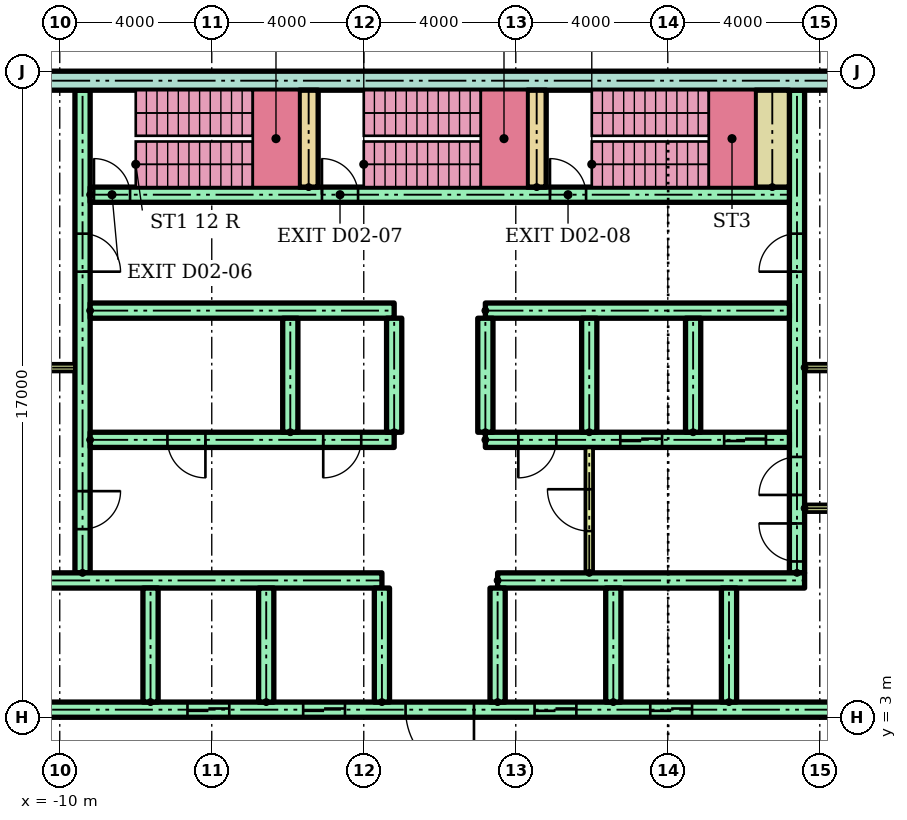
"""IFC4 building model, lengths in metres.
Left out: names, types, materials, properties, quantities, classifications, styles, units other than length and angle.
Written with IfcOpenShell. Run it as: python <this file> out.ifc"""

import sys

from ifc_helpers import new_model, si_unit, direction, frame, frame_2d, origin, place, context, subcontext, project, spatial, rectangle, extrude, element, fill, save


model = new_model("IFC4")
c1 = context("Model", 3, precision=1e-05, world=origin(), true_north=direction((0.0, 1.0)))
c2 = subcontext(c1, "Body", "Model", "MODEL_VIEW")
j1 = project(units=[si_unit("LENGTHUNIT", "METRE"), si_unit("PLANEANGLEUNIT", "RADIAN")], contexts=[c1])
p1 = place(None, origin())
s1 = spatial("IfcSite", under=j1, at=p1, CompositionType="ELEMENT")
p2 = place(p1, origin())
s2 = spatial("IfcBuilding", under=s1, at=p2, CompositionType="ELEMENT")
p3 = place(p2, frame((0.0, 0.0, 10.0)))
s3 = spatial("IfcBuildingStorey", under=s2, at=p3, CompositionType="ELEMENT", Elevation=10.0)
p4 = place(p3, frame((-13.5, 19.75, 0.0)))
e1 = element("IfcWall", 1, at=p4, inside=s3, PredefinedType="SHEAR", context=c2, shape_type="SweptSolid", body=[
    extrude(rectangle(XDim=27.0, YDim=0.5, at=frame_2d((13.5, 0.0))), origin(), (0.0, 0.0, 1.0), 3.7),
])
p5 = place(p3, frame((-9.4, 6.8, 0.0), z_axis=(0.0, 0.0, 1.0), x_axis=(0.0, 1.0, 0.0)))
e2 = element("IfcWall", 2, at=p5, inside=s3, PredefinedType="SHEAR", context=c2, shape_type="SweptSolid", body=[
    extrude(rectangle(XDim=12.7, YDim=0.4, at=frame_2d((6.35, 0.0))), origin(), (0.0, 0.0, 1.0), 3.7),
])
p6 = place(p5, frame((1.15, 0.0, 0.0)))
e3 = element("IfcOpeningElement", 3, at=p6, cuts=e2, PredefinedType="OPENING", context=c2, shape_type="SweptSolid", body=[
    extrude(rectangle(XDim=1.0, YDim=2.1, at=frame_2d((0.5, 1.05))), frame((0.0, 0.21, 0.0), z_axis=(0.0, -1.0, 0.0), x_axis=(1.0, 0.0, 0.0)), (0.0, 0.0, 1.0), 0.42),
])
p7 = place(p5, frame((7.925, 0.0, 0.0)))
e4 = element("IfcOpeningElement", 4, at=p7, cuts=e2, PredefinedType="OPENING", context=c2, shape_type="SweptSolid", body=[
    extrude(rectangle(XDim=1.0, YDim=2.1, at=frame_2d((0.5, 1.05))), frame((0.0, 0.21, 0.0), z_axis=(0.0, -1.0, 0.0), x_axis=(1.0, 0.0, 0.0)), (0.0, 0.0, 1.0), 0.42),
])
p8 = place(p3, frame((9.4, 6.8, 0.0), z_axis=(0.0, 0.0, 1.0), x_axis=(0.0, 1.0, 0.0)))
e5 = element("IfcWall", 5, at=p8, inside=s3, PredefinedType="SHEAR", context=c2, shape_type="SweptSolid", body=[
    extrude(rectangle(XDim=12.7, YDim=0.4, at=frame_2d((6.35, 0.0))), origin(), (0.0, 0.0, 1.0), 3.7),
])
p9 = place(p8, frame((0.3, 0.0, 0.0)))
e6 = element("IfcOpeningElement", 6, at=p9, cuts=e5, PredefinedType="OPENING", context=c2, shape_type="SweptSolid", body=[
    extrude(rectangle(XDim=1.0, YDim=2.1, at=frame_2d((0.5, 1.05))), frame((0.0, 0.21, 0.0), z_axis=(0.0, -1.0, 0.0), x_axis=(1.0, 0.0, 0.0)), (0.0, 0.0, 1.0), 0.42),
])
p10 = place(p8, frame((2.05, 0.0, 0.0)))
e7 = element("IfcOpeningElement", 7, at=p10, cuts=e5, PredefinedType="OPENING", context=c2, shape_type="SweptSolid", body=[
    extrude(rectangle(XDim=1.0, YDim=2.1, at=frame_2d((0.5, 1.05))), frame((0.0, 0.21, 0.0), z_axis=(0.0, -1.0, 0.0), x_axis=(1.0, 0.0, 0.0)), (0.0, 0.0, 1.0), 0.42),
])
p11 = place(p8, frame((7.925, 0.0, 0.0)))
e8 = element("IfcOpeningElement", 8, at=p11, cuts=e5, PredefinedType="OPENING", context=c2, shape_type="SweptSolid", body=[
    extrude(rectangle(XDim=1.0, YDim=2.1, at=frame_2d((0.5, 1.05))), frame((0.0, 0.21, 0.0), z_axis=(0.0, -1.0, 0.0), x_axis=(1.0, 0.0, 0.0)), (0.0, 0.0, 1.0), 0.42),
])
p12 = place(p3, frame((-13.5, 3.2, 0.0)))
e9 = element("IfcWall", 9, at=p12, inside=s3, PredefinedType="SHEAR", context=c2, shape_type="SweptSolid", body=[
    extrude(rectangle(XDim=27.0, YDim=0.4, at=frame_2d((13.5, 0.0))), origin(), (0.0, 0.0, 1.0), 3.7),
])
p13 = place(p12, frame((6.861, 0.0, 0.0)))
e10 = element("IfcOpeningElement", 10, at=p13, cuts=e9, PredefinedType="OPENING", context=c2, shape_type="SweptSolid", body=[
    extrude(rectangle(XDim=1.1, YDim=2.1, at=frame_2d((0.55, 1.05))), frame((0.0, 0.21, 0.0), z_axis=(0.0, -1.0, 0.0), x_axis=(1.0, 0.0, 0.0)), (0.0, 0.0, 1.0), 0.42),
])
p14 = place(p12, frame((9.906, 0.0, 0.0)))
e11 = element("IfcOpeningElement", 11, at=p14, cuts=e9, PredefinedType="OPENING", context=c2, shape_type="SweptSolid", body=[
    extrude(rectangle(XDim=1.1, YDim=2.1, at=frame_2d((0.55, 1.05))), frame((0.0, 0.21, 0.0), z_axis=(0.0, -1.0, 0.0), x_axis=(1.0, 0.0, 0.0)), (0.0, 0.0, 1.0), 0.42),
])
p15 = place(p12, frame((15.994, 0.0, 0.0)))
e12 = element("IfcOpeningElement", 12, at=p15, cuts=e9, PredefinedType="OPENING", context=c2, shape_type="SweptSolid", body=[
    extrude(rectangle(XDim=1.1, YDim=2.1, at=frame_2d((0.55, 1.05))), frame((0.0, 0.21, 0.0), z_axis=(0.0, -1.0, 0.0), x_axis=(1.0, 0.0, 0.0)), (0.0, 0.0, 1.0), 0.42),
])
p16 = place(p12, frame((19.039, 0.0, 0.0)))
e13 = element("IfcOpeningElement", 13, at=p16, cuts=e9, PredefinedType="OPENING", context=c2, shape_type="SweptSolid", body=[
    extrude(rectangle(XDim=1.1, YDim=2.1, at=frame_2d((0.55, 1.05))), frame((0.0, 0.21, 0.0), z_axis=(0.0, -1.0, 0.0), x_axis=(1.0, 0.0, 0.0)), (0.0, 0.0, 1.0), 0.42),
])
p17 = place(p12, frame((12.6, 0.0, 0.0)))
e14 = element("IfcOpeningElement", 14, at=p17, cuts=e9, PredefinedType="OPENING", context=c2, shape_type="SweptSolid", body=[
    extrude(rectangle(XDim=1.8, YDim=2.1, at=frame_2d((0.9, 1.05))), frame((0.0, 0.21, 0.0), z_axis=(0.0, -1.0, 0.0), x_axis=(1.0, 0.0, 0.0)), (0.0, 0.0, 1.0), 0.42),
])
p18 = place(p3, frame((-13.5, 6.6, 0.0)))
e15 = element("IfcWall", 15, at=p18, inside=s3, PredefinedType="SHEAR", context=c2, shape_type="SweptSolid", body=[
    extrude(rectangle(XDim=11.978, YDim=0.4, at=frame_2d((5.989, 0.0))), origin(), (0.0, 0.0, 1.0), 3.7),
])
p19 = place(p3, frame((1.522, 6.6, 0.0)))
e16 = element("IfcWall", 16, at=p19, inside=s3, PredefinedType="SHEAR", context=c2, shape_type="SweptSolid", body=[
    extrude(rectangle(XDim=8.078, YDim=0.4, at=frame_2d((4.039, 0.0))), origin(), (0.0, 0.0, 1.0), 3.7),
])
for number, where, z_axis, x_axis in (
    (17, (-7.611, 3.4, 0.0), (0.0, 0.0, 1.0), (0.0, 1.0, 0.0)),
    (18, (-4.567, 3.4, 0.0), (0.0, 0.0, 1.0), (0.0, 1.0, 0.0)),
    (19, (-1.522, 3.4, 0.0), (0.0, 0.0, 1.0), (0.0, 1.0, 0.0)),
    (20, (1.522, 3.4, 0.0), (0.0, 0.0, 1.0), (0.0, 1.0, 0.0)),
    (21, (4.567, 3.4, 0.0), (0.0, 0.0, 1.0), (0.0, 1.0, 0.0)),
    (22, (7.611, 3.4, 0.0), (0.0, 0.0, 1.0), (0.0, 1.0, 0.0)),
):
    element("IfcWall", number, at=place(p3, frame(where, z_axis=z_axis, x_axis=x_axis)), inside=s3, PredefinedType="SHEAR", context=c2, shape_type="SweptSolid", body=[
        extrude(rectangle(XDim=3.0, YDim=0.4, at=frame_2d((1.5, 0.0))), origin(), (0.0, 0.0, 1.0), 3.7),
    ])
p20 = place(p3, frame((-9.2, 10.3, 0.0)))
e23 = element("IfcWall", 23, at=p20, inside=s3, PredefinedType="SHEAR", context=c2, shape_type="SweptSolid", body=[
    extrude(rectangle(XDim=8.0, YDim=0.4, at=frame_2d((4.0, 0.0))), origin(), (0.0, 0.0, 1.0), 3.7),
])
p21 = place(p20, frame((2.033, 0.0, 0.0)))
e24 = element("IfcOpeningElement", 24, at=p21, cuts=e23, PredefinedType="OPENING", context=c2, shape_type="SweptSolid", body=[
    extrude(rectangle(XDim=1.0, YDim=2.1, at=frame_2d((0.5, 1.05))), frame((0.0, 0.21, 0.0), z_axis=(0.0, -1.0, 0.0), x_axis=(1.0, 0.0, 0.0)), (0.0, 0.0, 1.0), 0.42),
])
p22 = place(p20, frame((6.133, 0.0, 0.0)))
e25 = element("IfcOpeningElement", 25, at=p22, cuts=e23, PredefinedType="OPENING", context=c2, shape_type="SweptSolid", body=[
    extrude(rectangle(XDim=1.0, YDim=2.1, at=frame_2d((0.5, 1.05))), frame((0.0, 0.21, 0.0), z_axis=(0.0, -1.0, 0.0), x_axis=(1.0, 0.0, 0.0)), (0.0, 0.0, 1.0), 0.42),
])
p23 = place(p3, frame((-9.2, 13.7, 0.0)))
e26 = element("IfcWall", 26, at=p23, inside=s3, PredefinedType="SHEAR", context=c2, shape_type="SweptSolid", body=[
    extrude(rectangle(XDim=8.0, YDim=0.4, at=frame_2d((4.0, 0.0))), origin(), (0.0, 0.0, 1.0), 3.7),
])
p24 = place(p3, frame((1.2, 10.3, 0.0)))
e27 = element("IfcWall", 27, at=p24, inside=s3, PredefinedType="SHEAR", context=c2, shape_type="SweptSolid", body=[
    extrude(rectangle(XDim=8.0, YDim=0.4, at=frame_2d((4.0, 0.0))), origin(), (0.0, 0.0, 1.0), 3.7),
])
p25 = place(p24, frame((3.55, 0.0, 0.0)))
e28 = element("IfcOpeningElement", 28, at=p25, cuts=e27, PredefinedType="OPENING", context=c2, shape_type="SweptSolid", body=[
    extrude(rectangle(XDim=1.1, YDim=2.1, at=frame_2d((0.55, 1.05))), frame((0.0, 0.21, 0.0), z_axis=(0.0, -1.0, 0.0), x_axis=(1.0, 0.0, 0.0)), (0.0, 0.0, 1.0), 0.42),
])
p26 = place(p24, frame((6.283, 0.0, 0.0)))
e29 = element("IfcOpeningElement", 29, at=p26, cuts=e27, PredefinedType="OPENING", context=c2, shape_type="SweptSolid", body=[
    extrude(rectangle(XDim=1.1, YDim=2.1, at=frame_2d((0.55, 1.05))), frame((0.0, 0.21, 0.0), z_axis=(0.0, -1.0, 0.0), x_axis=(1.0, 0.0, 0.0)), (0.0, 0.0, 1.0), 0.42),
])
p27 = place(p24, frame((0.867, 0.0, 0.0)))
e30 = element("IfcOpeningElement", 30, at=p27, cuts=e27, PredefinedType="OPENING", context=c2, shape_type="SweptSolid", body=[
    extrude(rectangle(XDim=1.0, YDim=2.1, at=frame_2d((0.5, 1.05))), frame((0.0, 0.21, 0.0), z_axis=(0.0, -1.0, 0.0), x_axis=(1.0, 0.0, 0.0)), (0.0, 0.0, 1.0), 0.42),
])
p28 = place(p3, frame((1.2, 13.7, 0.0)))
e31 = element("IfcWall", 31, at=p28, inside=s3, PredefinedType="SHEAR", context=c2, shape_type="SweptSolid", body=[
    extrude(rectangle(XDim=8.0, YDim=0.4, at=frame_2d((4.0, 0.0))), origin(), (0.0, 0.0, 1.0), 3.7),
])
for number, where, z_axis, x_axis in (
    (32, (-3.933, 10.5, 0.0), (0.0, 0.0, 1.0), (0.0, 1.0, 0.0)),
    (33, (-1.2, 10.5, 0.0), (0.0, 0.0, 1.0), (0.0, 1.0, 0.0)),
    (34, (1.2, 10.5, 0.0), (0.0, 0.0, 1.0), (0.0, 1.0, 0.0)),
    (35, (3.933, 10.5, 0.0), (0.0, 0.0, 1.0), (0.0, 1.0, 0.0)),
    (36, (6.667, 10.5, 0.0), (0.0, 0.0, 1.0), (0.0, 1.0, 0.0)),
):
    element("IfcWall", number, at=place(p3, frame(where, z_axis=z_axis, x_axis=x_axis)), inside=s3, PredefinedType="SHEAR", context=c2, shape_type="SweptSolid", body=[
        extrude(rectangle(XDim=3.0, YDim=0.4, at=frame_2d((1.5, 0.0))), origin(), (0.0, 0.0, 1.0), 3.7),
    ])
p29 = place(p3, frame((3.933, 6.8, 0.0), z_axis=(0.0, 0.0, 1.0), x_axis=(0.0, 1.0, 0.0)))
e37 = element("IfcWall", 37, at=p29, inside=s3, PredefinedType="PARTITIONING", context=c2, shape_type="SweptSolid", body=[
    extrude(rectangle(XDim=3.3, YDim=0.2, at=frame_2d((1.65, 0.0))), origin(), (0.0, 0.0, 1.0), 3.7),
])
p30 = place(p29, frame((1.1, 0.0, 0.0)))
e38 = element("IfcOpeningElement", 38, at=p30, cuts=e37, PredefinedType="OPENING", context=c2, shape_type="SweptSolid", body=[
    extrude(rectangle(XDim=1.1, YDim=2.1, at=frame_2d((0.55, 1.05))), frame((0.0, 0.11, 0.0), z_axis=(0.0, -1.0, 0.0), x_axis=(1.0, 0.0, 0.0)), (0.0, 0.0, 1.0), 0.22),
])
p31 = place(p3, frame((-9.2, 16.75, 0.0)))
e39 = element("IfcWall", 39, at=p31, inside=s3, PredefinedType="SHEAR", context=c2, shape_type="SweptSolid", body=[
    extrude(rectangle(XDim=18.4, YDim=0.4, at=frame_2d((9.2, 0.0))), origin(), (0.0, 0.0, 1.0), 3.7),
])
p32 = place(p31, frame((0.1, 0.0, 0.0)))
e40 = element("IfcOpeningElement", 40, at=p32, cuts=e39, PredefinedType="OPENING", context=c2, shape_type="SweptSolid", body=[
    extrude(rectangle(XDim=0.95, YDim=2.1, at=frame_2d((0.475, 1.05))), frame((0.0, 0.21, 0.0), z_axis=(0.0, -1.0, 0.0), x_axis=(1.0, 0.0, 0.0)), (0.0, 0.0, 1.0), 0.42),
])
p33 = place(p31, frame((6.1, 0.0, 0.0)))
e41 = element("IfcOpeningElement", 41, at=p33, cuts=e39, PredefinedType="OPENING", context=c2, shape_type="SweptSolid", body=[
    extrude(rectangle(XDim=0.95, YDim=2.1, at=frame_2d((0.475, 1.05))), frame((0.0, 0.21, 0.0), z_axis=(0.0, -1.0, 0.0), x_axis=(1.0, 0.0, 0.0)), (0.0, 0.0, 1.0), 0.42),
])
p34 = place(p31, frame((12.1, 0.0, 0.0)))
e42 = element("IfcOpeningElement", 42, at=p34, cuts=e39, PredefinedType="OPENING", context=c2, shape_type="SweptSolid", body=[
    extrude(rectangle(XDim=0.95, YDim=2.1, at=frame_2d((0.475, 1.05))), frame((0.0, 0.21, 0.0), z_axis=(0.0, -1.0, 0.0), x_axis=(1.0, 0.0, 0.0)), (0.0, 0.0, 1.0), 0.42),
])
for number, where, z_axis, x_axis in (
    (43, (-3.45, 16.95, 0.0), (0.0, 0.0, 1.0), (0.0, 1.0, 0.0)),
    (44, (2.55, 16.95, 0.0), (0.0, 0.0, 1.0), (0.0, 1.0, 0.0)),
):
    element("IfcWall", number, at=place(p3, frame(where, z_axis=z_axis, x_axis=x_axis)), inside=s3, PredefinedType="SHEAR", context=c2, shape_type="SweptSolid", body=[
        extrude(rectangle(XDim=2.55, YDim=0.5, at=frame_2d((1.275, 0.0))), origin(), (0.0, 0.0, 1.0), 3.7),
    ])
p35 = place(p3, frame((8.75, 16.95, 0.0), z_axis=(0.0, 0.0, 1.0), x_axis=(0.0, 1.0, 0.0)))
e45 = element("IfcWall", 45, at=p35, inside=s3, PredefinedType="SHEAR", context=c2, shape_type="SweptSolid", body=[
    extrude(rectangle(XDim=2.55, YDim=0.9, at=frame_2d((1.275, 0.0))), origin(), (0.0, 0.0, 1.0), 3.7),
])
for number, where in (
    (46, (-13.5, 12.2, 0.0)),
    (47, (9.6, 8.5, 0.0)),
    (48, (9.6, 12.2, 0.0)),
):
    element("IfcWall", number, at=place(p3, frame(where)), inside=s3, PredefinedType="PARTITIONING", context=c2, shape_type="SweptSolid", body=[
        extrude(rectangle(XDim=3.9, YDim=0.2, at=frame_2d((1.95, 0.0))), origin(), (0.0, 0.0, 1.0), 3.7),
    ])
p36 = place(p13, origin())
e49 = element("IfcDoor", 49, at=p36, inside=s3, OperationType="SLIDING_TO_LEFT", PredefinedType="DOOR", context=c2, shape_type="SweptSolid", body=[
    extrude(rectangle(XDim=1.1, YDim=2.1, at=frame_2d((0.55, 1.05))), frame((0.0, 0.025, 0.0), z_axis=(0.0, -1.0, 0.0), x_axis=(1.0, 0.0, 0.0)), (0.0, 0.0, 1.0), 0.05),
])
fill(e10, e49)
p37 = place(p14, origin())
e50 = element("IfcDoor", 50, at=p37, inside=s3, OperationType="SLIDING_TO_LEFT", PredefinedType="DOOR", context=c2, shape_type="SweptSolid", body=[
    extrude(rectangle(XDim=1.1, YDim=2.1, at=frame_2d((0.55, 1.05))), frame((0.0, 0.025, 0.0), z_axis=(0.0, -1.0, 0.0), x_axis=(1.0, 0.0, 0.0)), (0.0, 0.0, 1.0), 0.05),
])
fill(e11, e50)
p38 = place(p15, origin())
e51 = element("IfcDoor", 51, at=p38, inside=s3, OperationType="SLIDING_TO_LEFT", PredefinedType="DOOR", context=c2, shape_type="SweptSolid", body=[
    extrude(rectangle(XDim=1.1, YDim=2.1, at=frame_2d((0.55, 1.05))), frame((0.0, 0.025, 0.0), z_axis=(0.0, -1.0, 0.0), x_axis=(1.0, 0.0, 0.0)), (0.0, 0.0, 1.0), 0.05),
])
fill(e12, e51)
p39 = place(p16, origin())
e52 = element("IfcDoor", 52, at=p39, inside=s3, OperationType="SLIDING_TO_LEFT", PredefinedType="DOOR", context=c2, shape_type="SweptSolid", body=[
    extrude(rectangle(XDim=1.1, YDim=2.1, at=frame_2d((0.55, 1.05))), frame((0.0, 0.025, 0.0), z_axis=(0.0, -1.0, 0.0), x_axis=(1.0, 0.0, 0.0)), (0.0, 0.0, 1.0), 0.05),
])
fill(e13, e52)
p40 = place(p17, frame((1.8, 0.0, 0.0), z_axis=(0.0, 0.0, 1.0), x_axis=(-1.0, 0.0, 0.0)))
e53 = element("IfcDoor", 53, at=p40, inside=s3, OperationType="DOUBLE_DOOR_SINGLE_SWING", PredefinedType="DOOR", context=c2, shape_type="SweptSolid", body=[
    extrude(rectangle(XDim=1.8, YDim=2.1, at=frame_2d((0.9, 1.05))), frame((0.0, 0.025, 0.0), z_axis=(0.0, -1.0, 0.0), x_axis=(1.0, 0.0, 0.0)), (0.0, 0.0, 1.0), 0.05),
])
fill(e14, e53)
p41 = place(p25, origin())
e54 = element("IfcDoor", 54, at=p41, inside=s3, OperationType="SLIDING_TO_LEFT", PredefinedType="DOOR", context=c2, shape_type="SweptSolid", body=[
    extrude(rectangle(XDim=1.1, YDim=2.1, at=frame_2d((0.55, 1.05))), frame((0.0, 0.025, 0.0), z_axis=(0.0, -1.0, 0.0), x_axis=(1.0, 0.0, 0.0)), (0.0, 0.0, 1.0), 0.05),
])
fill(e28, e54)
p42 = place(p26, origin())
e55 = element("IfcDoor", 55, at=p42, inside=s3, OperationType="SLIDING_TO_LEFT", PredefinedType="DOOR", context=c2, shape_type="SweptSolid", body=[
    extrude(rectangle(XDim=1.1, YDim=2.1, at=frame_2d((0.55, 1.05))), frame((0.0, 0.025, 0.0), z_axis=(0.0, -1.0, 0.0), x_axis=(1.0, 0.0, 0.0)), (0.0, 0.0, 1.0), 0.05),
])
fill(e29, e55)
p43 = place(p21, frame((1.0, 0.0, 0.0), z_axis=(0.0, 0.0, 1.0), x_axis=(-1.0, 0.0, 0.0)))
e56 = element("IfcDoor", 56, at=p43, inside=s3, OperationType="SINGLE_SWING_RIGHT", PredefinedType="DOOR", context=c2, shape_type="SweptSolid", body=[
    extrude(rectangle(XDim=1.0, YDim=2.1, at=frame_2d((0.5, 1.05))), frame((0.0, 0.025, 0.0), z_axis=(0.0, -1.0, 0.0), x_axis=(1.0, 0.0, 0.0)), (0.0, 0.0, 1.0), 0.05),
])
fill(e24, e56)
p44 = place(p22, frame((1.0, 0.0, 0.0), z_axis=(0.0, 0.0, 1.0), x_axis=(-1.0, 0.0, 0.0)))
e57 = element("IfcDoor", 57, at=p44, inside=s3, OperationType="SINGLE_SWING_LEFT", PredefinedType="DOOR", context=c2, shape_type="SweptSolid", body=[
    extrude(rectangle(XDim=1.0, YDim=2.1, at=frame_2d((0.5, 1.05))), frame((0.0, 0.025, 0.0), z_axis=(0.0, -1.0, 0.0), x_axis=(1.0, 0.0, 0.0)), (0.0, 0.0, 1.0), 0.05),
])
fill(e25, e57)
p45 = place(p27, frame((1.0, 0.0, 0.0), z_axis=(0.0, 0.0, 1.0), x_axis=(-1.0, 0.0, 0.0)))
e58 = element("IfcDoor", 58, at=p45, inside=s3, OperationType="SINGLE_SWING_LEFT", PredefinedType="DOOR", context=c2, shape_type="SweptSolid", body=[
    extrude(rectangle(XDim=1.0, YDim=2.1, at=frame_2d((0.5, 1.05))), frame((0.0, 0.025, 0.0), z_axis=(0.0, -1.0, 0.0), x_axis=(1.0, 0.0, 0.0)), (0.0, 0.0, 1.0), 0.05),
])
fill(e30, e58)
p46 = place(p30, origin())
e59 = element("IfcDoor", 59, at=p46, inside=s3, OperationType="SINGLE_SWING_RIGHT", PredefinedType="DOOR", context=c2, shape_type="SweptSolid", body=[
    extrude(rectangle(XDim=1.1, YDim=2.1, at=frame_2d((0.55, 1.05))), frame((0.0, 0.025, 0.0), z_axis=(0.0, -1.0, 0.0), x_axis=(1.0, 0.0, 0.0)), (0.0, 0.0, 1.0), 0.05),
])
fill(e38, e59)
p47 = place(p32, origin())
e60 = element("IfcDoor", 60, at=p47, inside=s3, OperationType="SINGLE_SWING_LEFT", PredefinedType="DOOR", context=c2, shape_type="SweptSolid", body=[
    extrude(rectangle(XDim=0.95, YDim=2.1, at=frame_2d((0.475, 1.05))), frame((0.0, 0.025, 0.0), z_axis=(0.0, -1.0, 0.0), x_axis=(1.0, 0.0, 0.0)), (0.0, 0.0, 1.0), 0.05),
])
fill(e40, e60)
p48 = place(p33, origin())
e61 = element("IfcDoor", 61, at=p48, inside=s3, OperationType="SINGLE_SWING_LEFT", PredefinedType="DOOR", context=c2, shape_type="SweptSolid", body=[
    extrude(rectangle(XDim=0.95, YDim=2.1, at=frame_2d((0.475, 1.05))), frame((0.0, 0.025, 0.0), z_axis=(0.0, -1.0, 0.0), x_axis=(1.0, 0.0, 0.0)), (0.0, 0.0, 1.0), 0.05),
])
fill(e41, e61)
p49 = place(p34, origin())
e62 = element("IfcDoor", 62, at=p49, inside=s3, OperationType="SINGLE_SWING_LEFT", PredefinedType="DOOR", context=c2, shape_type="SweptSolid", body=[
    extrude(rectangle(XDim=0.95, YDim=2.1, at=frame_2d((0.475, 1.05))), frame((0.0, 0.025, 0.0), z_axis=(0.0, -1.0, 0.0), x_axis=(1.0, 0.0, 0.0)), (0.0, 0.0, 1.0), 0.05),
])
fill(e42, e62)
p50 = place(p6, frame((1.0, 0.0, 0.0), z_axis=(0.0, 0.0, 1.0), x_axis=(-1.0, 0.0, 0.0)))
e63 = element("IfcDoor", 63, at=p50, inside=s3, OperationType="SINGLE_SWING_RIGHT", PredefinedType="DOOR", context=c2, shape_type="SweptSolid", body=[
    extrude(rectangle(XDim=1.0, YDim=2.1, at=frame_2d((0.5, 1.05))), frame((0.0, 0.025, 0.0), z_axis=(0.0, -1.0, 0.0), x_axis=(1.0, 0.0, 0.0)), (0.0, 0.0, 1.0), 0.05),
])
fill(e3, e63)
p51 = place(p7, frame((1.0, 0.0, 0.0), z_axis=(0.0, 0.0, 1.0), x_axis=(-1.0, 0.0, 0.0)))
e64 = element("IfcDoor", 64, at=p51, inside=s3, OperationType="SINGLE_SWING_LEFT", PredefinedType="DOOR", context=c2, shape_type="SweptSolid", body=[
    extrude(rectangle(XDim=1.0, YDim=2.1, at=frame_2d((0.5, 1.05))), frame((0.0, 0.025, 0.0), z_axis=(0.0, -1.0, 0.0), x_axis=(1.0, 0.0, 0.0)), (0.0, 0.0, 1.0), 0.05),
])
fill(e4, e64)
p52 = place(p9, origin())
e65 = element("IfcDoor", 65, at=p52, inside=s3, OperationType="SINGLE_SWING_RIGHT", PredefinedType="DOOR", context=c2, shape_type="SweptSolid", body=[
    extrude(rectangle(XDim=1.0, YDim=2.1, at=frame_2d((0.5, 1.05))), frame((0.0, 0.025, 0.0), z_axis=(0.0, -1.0, 0.0), x_axis=(1.0, 0.0, 0.0)), (0.0, 0.0, 1.0), 0.05),
])
fill(e6, e65)
p53 = place(p10, origin())
e66 = element("IfcDoor", 66, at=p53, inside=s3, OperationType="SINGLE_SWING_LEFT", PredefinedType="DOOR", context=c2, shape_type="SweptSolid", body=[
    extrude(rectangle(XDim=1.0, YDim=2.1, at=frame_2d((0.5, 1.05))), frame((0.0, 0.025, 0.0), z_axis=(0.0, -1.0, 0.0), x_axis=(1.0, 0.0, 0.0)), (0.0, 0.0, 1.0), 0.05),
])
fill(e7, e66)
p54 = place(p11, origin())
e67 = element("IfcDoor", 67, at=p54, inside=s3, OperationType="SINGLE_SWING_LEFT", PredefinedType="DOOR", context=c2, shape_type="SweptSolid", body=[
    extrude(rectangle(XDim=1.0, YDim=2.1, at=frame_2d((0.5, 1.05))), frame((0.0, 0.025, 0.0), z_axis=(0.0, -1.0, 0.0), x_axis=(1.0, 0.0, 0.0)), (0.0, 0.0, 1.0), 0.05),
])
fill(e8, e67)
save(model, sys.argv[1])
